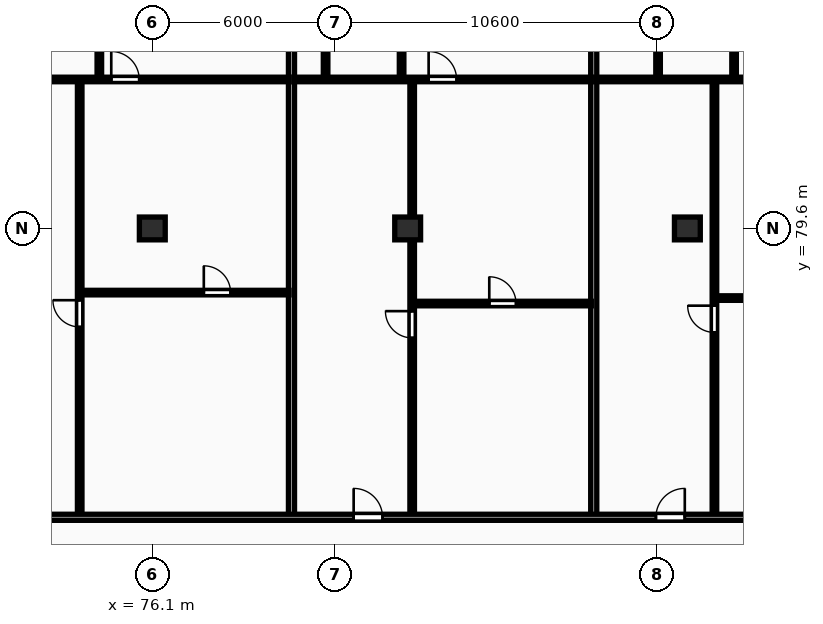
"""IFC4 building model, lengths in metres.
Left out: names, types, materials, properties, quantities, classifications, styles, units other than length and angle.
Written with IfcOpenShell. Run it as: python <this file> out.ifc"""

import sys

from ifc_helpers import new_model, si_unit, direction, frame, frame_2d, origin, origin_2d, place, context, subcontext, project, spatial, rectangle, extrude, element, fill, save


model = new_model("IFC4")
c1 = context("Model", 3, precision=1e-05, world=origin(), true_north=direction((0.0, 1.0)))
c2 = subcontext(c1, "Body", "Model", "MODEL_VIEW")
j1 = project(units=[si_unit("LENGTHUNIT", "METRE"), si_unit("PLANEANGLEUNIT", "RADIAN")], contexts=[c1])
p1 = place(None, origin())
s1 = spatial("IfcSite", under=j1, at=p1, CompositionType="ELEMENT")
p2 = place(p1, origin())
s2 = spatial("IfcBuilding", under=s1, at=p2, CompositionType="ELEMENT")
p3 = place(p2, frame((0.0, 0.0, 204.35)))
s3 = spatial("IfcBuildingStorey", under=s2, at=p3, CompositionType="ELEMENT", Elevation=204.35)
for number, where, z_axis, x_axis in (
    (1, (76.1, 79.6, 0.0), (0.0, 0.0, 1.0), (1.0, 0.0, 0.0)),
    (2, (84.5, 79.6, 0.0), (0.0, 0.0, 1.0), (1.0, 0.0, 0.0)),
    (3, (93.7, 79.6, 0.0), (0.0, 0.0, 1.0), (1.0, 0.0, 0.0)),
):
    element("IfcColumn", number, at=place(p3, frame(where, z_axis=z_axis, x_axis=x_axis)), inside=s3, PredefinedType="COLUMN", context=c2, shape_type="SweptSolid", body=[
        extrude(rectangle(XDim=0.85, YDim=0.75, at=origin_2d()), origin(), (0.0, 0.0, 1.0), 3.25),
    ])
p4 = place(p3, frame((80.678, 70.18, 0.0), z_axis=(0.0, 0.0, 1.0), x_axis=(0.0, 1.0, 0.0)))
e4 = element("IfcWall", 4, at=p4, inside=s3, PredefinedType="PARTITIONING", context=c2, shape_type="SweptSolid", body=[
    extrude(rectangle(XDim=24.32, YDim=0.2, at=frame_2d((12.16, 0.0))), origin(), (0.0, 0.0, 1.0), 2.98),
])
p5 = place(p3, frame((73.772, 77.49, 0.0), z_axis=(0.0, 0.0, 1.0), x_axis=(1.0, 0.0, 0.0)))
e5 = element("IfcWall", 5, at=p5, inside=s3, PredefinedType="PARTITIONING", context=c2, shape_type="SweptSolid", body=[
    extrude(rectangle(XDim=6.826, YDim=0.15, at=frame_2d((3.413, 0.0))), origin(), (0.0, 0.0, 1.0), 2.98),
])
p6 = place(p5, frame((4.022, 0.0, 0.0)))
e6 = element("IfcOpeningElement", 6, at=p6, cuts=e5, PredefinedType="OPENING", context=c2, shape_type="SweptSolid", body=[
    extrude(rectangle(XDim=0.88, YDim=2.06, at=frame_2d((0.44, 1.03))), frame((0.0, 0.085, 0.0), z_axis=(0.0, -1.0, 0.0), x_axis=(1.0, 0.0, 0.0)), (0.0, 0.0, 1.0), 0.17),
])
p7 = place(p3, frame((73.712, 70.16, 0.0), z_axis=(0.0, 0.0, 1.0), x_axis=(0.0, 1.0, 0.0)))
e7 = element("IfcWall", 7, at=p7, inside=s3, PredefinedType="PARTITIONING", context=c2, shape_type="SweptSolid", body=[
    extrude(rectangle(XDim=14.3, YDim=0.15, at=frame_2d((7.15, 0.0))), origin(), (0.0, 0.0, 1.0), 2.98),
])
p8 = place(p7, frame((6.2, 0.0, 0.0)))
e8 = element("IfcOpeningElement", 8, at=p8, cuts=e7, PredefinedType="OPENING", context=c2, shape_type="SweptSolid", body=[
    extrude(rectangle(XDim=0.88, YDim=2.06, at=frame_2d((0.44, 1.03))), frame((0.0, 0.085, 0.0), z_axis=(0.0, -1.0, 0.0), x_axis=(1.0, 0.0, 0.0)), (0.0, 0.0, 1.0), 0.17),
])
p9 = place(p3, frame((74.358, 84.54, 0.0), z_axis=(0.0, 0.0, 1.0), x_axis=(0.0, 1.0, 0.0)))
e9 = element("IfcWall", 9, at=p9, inside=s3, PredefinedType="PARTITIONING", context=c2, shape_type="SweptSolid", body=[
    extrude(rectangle(XDim=5.0, YDim=0.15, at=frame_2d((2.5, 0.0))), origin(), (0.0, 0.0, 1.0), 2.98),
])
p10 = place(p9, frame((2.08, 0.0, 0.0)))
e10 = element("IfcOpeningElement", 10, at=p10, cuts=e9, PredefinedType="OPENING", context=c2, shape_type="SweptSolid", body=[
    extrude(rectangle(XDim=0.84, YDim=2.04, at=frame_2d((0.42, 1.02))), frame((0.0, 0.085, 0.0), z_axis=(0.0, -1.0, 0.0), x_axis=(1.0, 0.0, 0.0)), (0.0, 0.0, 1.0), 0.17),
])
p11 = place(p3, frame((69.822, 84.5, 0.0), z_axis=(0.0, 0.0, 1.0), x_axis=(1.0, 0.0, 0.0)))
e11 = element("IfcWall", 11, at=p11, inside=s3, PredefinedType="PARTITIONING", context=c2, shape_type="SweptSolid", body=[
    extrude(rectangle(XDim=10.776, YDim=0.15, at=frame_2d((5.388, 0.0))), origin(), (0.0, 0.0, 1.0), 2.98),
])
p12 = place(p11, frame((4.928, 0.0, 0.0)))
e12 = element("IfcOpeningElement", 12, at=p12, cuts=e11, PredefinedType="OPENING", context=c2, shape_type="SweptSolid", body=[
    extrude(rectangle(XDim=0.92, YDim=2.08, at=frame_2d((0.46, 1.04))), frame((0.0, 0.085, 0.0), z_axis=(0.0, -1.0, 0.0), x_axis=(1.0, 0.0, 0.0)), (0.0, 0.0, 1.0), 0.17),
])
p13 = place(p3, frame((90.62, 70.18, 0.0), z_axis=(0.0, 0.0, 1.0), x_axis=(0.0, 1.0, 0.0)))
e13 = element("IfcWall", 13, at=p13, inside=s3, PredefinedType="PARTITIONING", context=c2, shape_type="SweptSolid", body=[
    extrude(rectangle(XDim=24.32, YDim=0.2, at=frame_2d((12.16, 0.0))), origin(), (0.0, 0.0, 1.0), 2.98),
])
p14 = place(p3, frame((84.708, 77.13, 0.0), z_axis=(0.0, 0.0, 1.0), x_axis=(1.0, 0.0, 0.0)))
e14 = element("IfcWall", 14, at=p14, inside=s3, PredefinedType="PARTITIONING", context=c2, shape_type="SweptSolid", body=[
    extrude(rectangle(XDim=5.832, YDim=0.15, at=frame_2d((2.916, 0.0))), origin(), (0.0, 0.0, 1.0), 2.98),
])
p15 = place(p14, frame((2.476, 0.0, 0.0)))
e15 = element("IfcOpeningElement", 15, at=p15, cuts=e14, PredefinedType="OPENING", context=c2, shape_type="SweptSolid", body=[
    extrude(rectangle(XDim=0.88, YDim=2.06, at=frame_2d((0.44, 1.03))), frame((0.0, 0.085, 0.0), z_axis=(0.0, -1.0, 0.0), x_axis=(1.0, 0.0, 0.0)), (0.0, 0.0, 1.0), 0.17),
])
p16 = place(p3, frame((84.648, 70.16, 0.0), z_axis=(0.0, 0.0, 1.0), x_axis=(0.0, 1.0, 0.0)))
e16 = element("IfcWall", 16, at=p16, inside=s3, PredefinedType="PARTITIONING", context=c2, shape_type="SweptSolid", body=[
    extrude(rectangle(XDim=14.3, YDim=0.15, at=frame_2d((7.15, 0.0))), origin(), (0.0, 0.0, 1.0), 2.287),
])
p17 = place(p16, frame((5.84, 0.0, 0.0)))
e17 = element("IfcOpeningElement", 17, at=p17, cuts=e16, PredefinedType="OPENING", context=c2, shape_type="SweptSolid", body=[
    extrude(rectangle(XDim=0.88, YDim=2.06, at=frame_2d((0.44, 1.03))), frame((0.0, 0.085, 0.0), z_axis=(0.0, -1.0, 0.0), x_axis=(1.0, 0.0, 0.0)), (0.0, 0.0, 1.0), 0.17),
])
p18 = place(p3, frame((81.8, 84.54, 0.0), z_axis=(0.0, 0.0, 1.0), x_axis=(0.0, 1.0, 0.0)))
e18 = element("IfcWall", 18, at=p18, inside=s3, PredefinedType="PARTITIONING", context=c2, shape_type="SweptSolid", body=[
    extrude(rectangle(XDim=5.0, YDim=0.15, at=frame_2d((2.5, 0.0))), origin(), (0.0, 0.0, 1.0), 2.98),
])
p19 = place(p18, frame((2.08, 0.0, 0.0)))
e19 = element("IfcOpeningElement", 19, at=p19, cuts=e18, PredefinedType="OPENING", context=c2, shape_type="SweptSolid", body=[
    extrude(rectangle(XDim=0.84, YDim=2.04, at=frame_2d((0.42, 1.02))), frame((0.0, 0.085, 0.0), z_axis=(0.0, -1.0, 0.0), x_axis=(1.0, 0.0, 0.0)), (0.0, 0.0, 1.0), 0.17),
])
p20 = place(p3, frame((84.3, 84.54, 0.0), z_axis=(0.0, 0.0, 1.0), x_axis=(0.0, 1.0, 0.0)))
e20 = element("IfcWall", 20, at=p20, inside=s3, PredefinedType="PARTITIONING", context=c2, shape_type="SweptSolid", body=[
    extrude(rectangle(XDim=5.0, YDim=0.15, at=frame_2d((2.5, 0.0))), origin(), (0.0, 0.0, 1.0), 2.287),
])
p21 = place(p20, frame((2.08, 0.0, 0.0)))
e21 = element("IfcOpeningElement", 21, at=p21, cuts=e20, PredefinedType="OPENING", context=c2, shape_type="SweptSolid", body=[
    extrude(rectangle(XDim=0.84, YDim=2.04, at=frame_2d((0.42, 1.02))), frame((0.0, 0.085, 0.0), z_axis=(0.0, -1.0, 0.0), x_axis=(1.0, 0.0, 0.0)), (0.0, 0.0, 1.0), 0.17),
])
p22 = place(p3, frame((80.758, 84.5, 0.0), z_axis=(0.0, 0.0, 1.0), x_axis=(1.0, 0.0, 0.0)))
e22 = element("IfcWall", 22, at=p22, inside=s3, PredefinedType="PARTITIONING", context=c2, shape_type="SweptSolid", body=[
    extrude(rectangle(XDim=9.782, YDim=0.15, at=frame_2d((4.891, 0.0))), origin(), (0.0, 0.0, 1.0), 2.98),
])
p23 = place(p22, frame((4.431, 0.0, 0.0)))
e23 = element("IfcOpeningElement", 23, at=p23, cuts=e22, PredefinedType="OPENING", context=c2, shape_type="SweptSolid", body=[
    extrude(rectangle(XDim=0.92, YDim=2.08, at=frame_2d((0.46, 1.04))), frame((0.0, 0.085, 0.0), z_axis=(0.0, -1.0, 0.0), x_axis=(1.0, 0.0, 0.0)), (0.0, 0.0, 1.0), 0.17),
])
p24 = place(p3, frame((94.65, 77.31, 0.0), z_axis=(0.0, 0.0, 1.0), x_axis=(1.0, 0.0, 0.0)))
e24 = element("IfcWall", 24, at=p24, inside=s3, PredefinedType="PARTITIONING", context=c2, shape_type="SweptSolid", body=[
    extrude(rectangle(XDim=6.826, YDim=0.15, at=frame_2d((3.413, 0.0))), origin(), (0.0, 0.0, 1.0), 2.98),
])
p25 = place(p24, frame((2.973, 0.0, 0.0)))
e25 = element("IfcOpeningElement", 25, at=p25, cuts=e24, PredefinedType="OPENING", context=c2, shape_type="SweptSolid", body=[
    extrude(rectangle(XDim=0.88, YDim=2.06, at=frame_2d((0.44, 1.03))), frame((0.0, 0.085, 0.0), z_axis=(0.0, -1.0, 0.0), x_axis=(1.0, 0.0, 0.0)), (0.0, 0.0, 1.0), 0.17),
])
p26 = place(p3, frame((94.59, 70.16, 0.0), z_axis=(0.0, 0.0, 1.0), x_axis=(0.0, 1.0, 0.0)))
e26 = element("IfcWall", 26, at=p26, inside=s3, PredefinedType="PARTITIONING", context=c2, shape_type="SweptSolid", body=[
    extrude(rectangle(XDim=14.3, YDim=0.15, at=frame_2d((7.15, 0.0))), origin(), (0.0, 0.0, 1.0), 2.98),
])
p27 = place(p26, frame((6.02, 0.0, 0.0)))
e27 = element("IfcOpeningElement", 27, at=p27, cuts=e26, PredefinedType="OPENING", context=c2, shape_type="SweptSolid", body=[
    extrude(rectangle(XDim=0.88, YDim=2.06, at=frame_2d((0.44, 1.03))), frame((0.0, 0.085, 0.0), z_axis=(0.0, -1.0, 0.0), x_axis=(1.0, 0.0, 0.0)), (0.0, 0.0, 1.0), 0.17),
])
p28 = place(p3, frame((92.736, 84.54, 0.0), z_axis=(0.0, 0.0, 1.0), x_axis=(0.0, 1.0, 0.0)))
e28 = element("IfcWall", 28, at=p28, inside=s3, PredefinedType="PARTITIONING", context=c2, shape_type="SweptSolid", body=[
    extrude(rectangle(XDim=5.0, YDim=0.15, at=frame_2d((2.5, 0.0))), origin(), (0.0, 0.0, 1.0), 2.98),
])
p29 = place(p28, frame((2.08, 0.0, 0.0)))
e29 = element("IfcOpeningElement", 29, at=p29, cuts=e28, PredefinedType="OPENING", context=c2, shape_type="SweptSolid", body=[
    extrude(rectangle(XDim=0.84, YDim=2.04, at=frame_2d((0.42, 1.02))), frame((0.0, 0.085, 0.0), z_axis=(0.0, -1.0, 0.0), x_axis=(1.0, 0.0, 0.0)), (0.0, 0.0, 1.0), 0.17),
])
p30 = place(p3, frame((95.236, 84.54, 0.0), z_axis=(0.0, 0.0, 1.0), x_axis=(0.0, 1.0, 0.0)))
e30 = element("IfcWall", 30, at=p30, inside=s3, PredefinedType="PARTITIONING", context=c2, shape_type="SweptSolid", body=[
    extrude(rectangle(XDim=5.0, YDim=0.15, at=frame_2d((2.5, 0.0))), origin(), (0.0, 0.0, 1.0), 2.98),
])
p31 = place(p30, frame((2.08, 0.0, 0.0)))
e31 = element("IfcOpeningElement", 31, at=p31, cuts=e30, PredefinedType="OPENING", context=c2, shape_type="SweptSolid", body=[
    extrude(rectangle(XDim=0.84, YDim=2.04, at=frame_2d((0.42, 1.02))), frame((0.0, 0.085, 0.0), z_axis=(0.0, -1.0, 0.0), x_axis=(1.0, 0.0, 0.0)), (0.0, 0.0, 1.0), 0.17),
])
p32 = place(p3, frame((90.7, 84.5, 0.0), z_axis=(0.0, 0.0, 1.0), x_axis=(1.0, 0.0, 0.0)))
e32 = element("IfcWall", 32, at=p32, inside=s3, PredefinedType="PARTITIONING", context=c2, shape_type="SweptSolid", body=[
    extrude(rectangle(XDim=10.776, YDim=0.15, at=frame_2d((5.388, 0.0))), origin(), (0.0, 0.0, 1.0), 2.98),
])
p33 = place(p32, frame((4.928, 0.0, 0.0)))
e33 = element("IfcOpeningElement", 33, at=p33, cuts=e32, PredefinedType="OPENING", context=c2, shape_type="SweptSolid", body=[
    extrude(rectangle(XDim=0.92, YDim=2.08, at=frame_2d((0.46, 1.04))), frame((0.0, 0.085, 0.0), z_axis=(0.0, -1.0, 0.0), x_axis=(1.0, 0.0, 0.0)), (0.0, 0.0, 1.0), 0.17),
])
p34 = place(p3, frame((59.8, 70.1, 0.0), z_axis=(0.0, 0.0, 1.0), x_axis=(1.0, 0.0, 0.0)))
e34 = element("IfcWall", 34, at=p34, inside=s3, PredefinedType="PARTITIONING", context=c2, shape_type="SweptSolid", body=[
    extrude(rectangle(XDim=68.6, YDim=0.2, at=frame_2d((34.3, 0.0))), origin(), (0.0, 0.0, 1.0), 2.98),
])
p35 = place(p34, frame((2.045, 0.0, 0.0)))
e35 = element("IfcOpeningElement", 35, at=p35, cuts=e34, PredefinedType="OPENING", context=c2, shape_type="SweptSolid", body=[
    extrude(rectangle(XDim=0.95, YDim=2.15, at=frame_2d((0.475, 1.075))), frame((0.0, 0.11, 0.0), z_axis=(0.0, -1.0, 0.0), x_axis=(1.0, 0.0, 0.0)), (0.0, 0.0, 1.0), 0.22),
])
p36 = place(p34, frame((11.987, 0.0, 0.0)))
e36 = element("IfcOpeningElement", 36, at=p36, cuts=e34, PredefinedType="OPENING", context=c2, shape_type="SweptSolid", body=[
    extrude(rectangle(XDim=0.95, YDim=2.15, at=frame_2d((0.475, 1.075))), frame((0.0, 0.11, 0.0), z_axis=(0.0, -1.0, 0.0), x_axis=(1.0, 0.0, 0.0)), (0.0, 0.0, 1.0), 0.22),
])
p37 = place(p34, frame((22.923, 0.0, 0.0)))
e37 = element("IfcOpeningElement", 37, at=p37, cuts=e34, PredefinedType="OPENING", context=c2, shape_type="SweptSolid", body=[
    extrude(rectangle(XDim=0.95, YDim=2.15, at=frame_2d((0.475, 1.075))), frame((0.0, 0.11, 0.0), z_axis=(0.0, -1.0, 0.0), x_axis=(1.0, 0.0, 0.0)), (0.0, 0.0, 1.0), 0.22),
])
p38 = place(p34, frame((32.865, 0.0, 0.0)))
e38 = element("IfcOpeningElement", 38, at=p38, cuts=e34, PredefinedType="OPENING", context=c2, shape_type="SweptSolid", body=[
    extrude(rectangle(XDim=0.95, YDim=2.15, at=frame_2d((0.475, 1.075))), frame((0.0, 0.11, 0.0), z_axis=(0.0, -1.0, 0.0), x_axis=(1.0, 0.0, 0.0)), (0.0, 0.0, 1.0), 0.22),
])
p39 = place(p34, frame((43.802, 0.0, 0.0)))
e39 = element("IfcOpeningElement", 39, at=p39, cuts=e34, PredefinedType="OPENING", context=c2, shape_type="SweptSolid", body=[
    extrude(rectangle(XDim=0.95, YDim=2.15, at=frame_2d((0.475, 1.075))), frame((0.0, 0.11, 0.0), z_axis=(0.0, -1.0, 0.0), x_axis=(1.0, 0.0, 0.0)), (0.0, 0.0, 1.0), 0.22),
])
p40 = place(p34, frame((56.726, 0.0, 0.0)))
e40 = element("IfcOpeningElement", 40, at=p40, cuts=e34, PredefinedType="OPENING", context=c2, shape_type="SweptSolid", body=[
    extrude(rectangle(XDim=0.95, YDim=2.15, at=frame_2d((0.475, 1.075))), frame((0.0, 0.11, 0.0), z_axis=(0.0, -1.0, 0.0), x_axis=(1.0, 0.0, 0.0)), (0.0, 0.0, 1.0), 0.22),
])
p41 = place(p6, origin())
e41 = element("IfcDoor", 41, at=p41, inside=s3, OperationType="SINGLE_SWING_LEFT", PredefinedType="DOOR", context=c2, shape_type="SweptSolid", body=[
    extrude(rectangle(XDim=0.88, YDim=2.06, at=frame_2d((0.44, 1.03))), frame((0.0, 0.025, 0.0), z_axis=(0.0, -1.0, 0.0), x_axis=(1.0, 0.0, 0.0)), (0.0, 0.0, 1.0), 0.05),
])
fill(e6, e41)
p42 = place(p8, origin())
e42 = element("IfcDoor", 42, at=p42, inside=s3, OperationType="SINGLE_SWING_RIGHT", PredefinedType="DOOR", context=c2, shape_type="SweptSolid", body=[
    extrude(rectangle(XDim=0.88, YDim=2.06, at=frame_2d((0.44, 1.03))), frame((0.0, 0.025, 0.0), z_axis=(0.0, -1.0, 0.0), x_axis=(1.0, 0.0, 0.0)), (0.0, 0.0, 1.0), 0.05),
])
fill(e8, e42)
p43 = place(p12, origin())
e43 = element("IfcDoor", 43, at=p43, inside=s3, OperationType="SINGLE_SWING_LEFT", PredefinedType="DOOR", context=c2, shape_type="SweptSolid", body=[
    extrude(rectangle(XDim=0.92, YDim=2.08, at=frame_2d((0.46, 1.04))), frame((0.0, 0.025, 0.0), z_axis=(0.0, -1.0, 0.0), x_axis=(1.0, 0.0, 0.0)), (0.0, 0.0, 1.0), 0.05),
])
fill(e12, e43)
p44 = place(p15, origin())
e44 = element("IfcDoor", 44, at=p44, inside=s3, OperationType="SINGLE_SWING_LEFT", PredefinedType="DOOR", context=c2, shape_type="SweptSolid", body=[
    extrude(rectangle(XDim=0.88, YDim=2.06, at=frame_2d((0.44, 1.03))), frame((0.0, 0.025, 0.0), z_axis=(0.0, -1.0, 0.0), x_axis=(1.0, 0.0, 0.0)), (0.0, 0.0, 1.0), 0.05),
])
fill(e15, e44)
p45 = place(p17, origin())
e45 = element("IfcDoor", 45, at=p45, inside=s3, OperationType="SINGLE_SWING_RIGHT", PredefinedType="DOOR", context=c2, shape_type="SweptSolid", body=[
    extrude(rectangle(XDim=0.88, YDim=2.06, at=frame_2d((0.44, 1.03))), frame((0.0, 0.025, 0.0), z_axis=(0.0, -1.0, 0.0), x_axis=(1.0, 0.0, 0.0)), (0.0, 0.0, 1.0), 0.05),
])
fill(e17, e45)
p46 = place(p23, origin())
e46 = element("IfcDoor", 46, at=p46, inside=s3, OperationType="SINGLE_SWING_LEFT", PredefinedType="DOOR", context=c2, shape_type="SweptSolid", body=[
    extrude(rectangle(XDim=0.92, YDim=2.08, at=frame_2d((0.46, 1.04))), frame((0.0, 0.025, 0.0), z_axis=(0.0, -1.0, 0.0), x_axis=(1.0, 0.0, 0.0)), (0.0, 0.0, 1.0), 0.05),
])
fill(e23, e46)
p47 = place(p27, origin())
e47 = element("IfcDoor", 47, at=p47, inside=s3, OperationType="SINGLE_SWING_RIGHT", PredefinedType="DOOR", context=c2, shape_type="SweptSolid", body=[
    extrude(rectangle(XDim=0.88, YDim=2.06, at=frame_2d((0.44, 1.03))), frame((0.0, 0.025, 0.0), z_axis=(0.0, -1.0, 0.0), x_axis=(1.0, 0.0, 0.0)), (0.0, 0.0, 1.0), 0.05),
])
fill(e27, e47)
p48 = place(p37, origin())
e48 = element("IfcDoor", 48, at=p48, inside=s3, OperationType="SINGLE_SWING_LEFT", PredefinedType="DOOR", context=c2, shape_type="SweptSolid", body=[
    extrude(rectangle(XDim=0.95, YDim=2.15, at=frame_2d((0.475, 1.075))), frame((0.0, 0.025, 0.0), z_axis=(0.0, -1.0, 0.0), x_axis=(1.0, 0.0, 0.0)), (0.0, 0.0, 1.0), 0.05),
])
fill(e37, e48)
p49 = place(p38, origin())
e49 = element("IfcDoor", 49, at=p49, inside=s3, OperationType="SINGLE_SWING_RIGHT", PredefinedType="DOOR", context=c2, shape_type="SweptSolid", body=[
    extrude(rectangle(XDim=0.95, YDim=2.15, at=frame_2d((0.475, 1.075))), frame((0.0, 0.025, 0.0), z_axis=(0.0, -1.0, 0.0), x_axis=(1.0, 0.0, 0.0)), (0.0, 0.0, 1.0), 0.05),
])
fill(e38, e49)
save(model, sys.argv[1])
